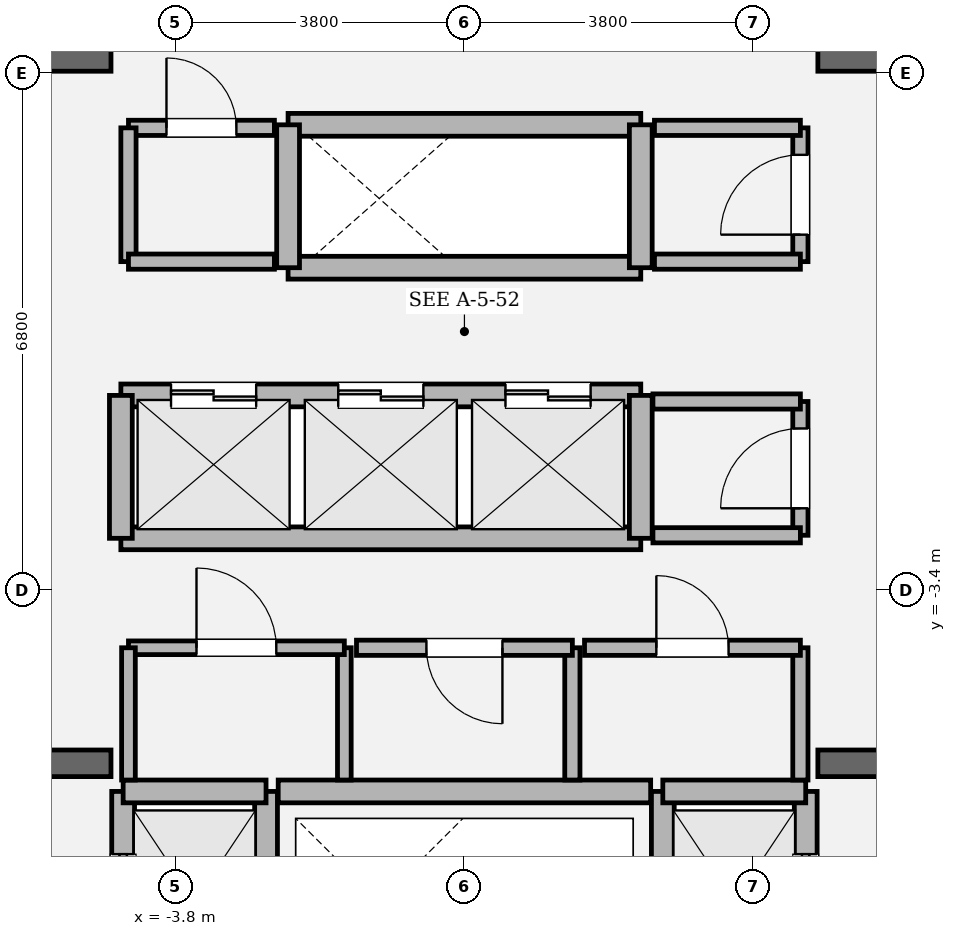
"""IFC4 building model, lengths in metres.
Left out: names, types, materials, properties, quantities, classifications, styles, units other than length and angle.
Written with IfcOpenShell. Run it as: python <this file> out.ifc"""

import sys

from ifc_helpers import new_model, si_unit, direction, frame, frame_2d, origin, place, context, subcontext, project, spatial, rectangle, extrude, element, fill, save


model = new_model("IFC4")
c1 = context("Model", 3, precision=1e-05, world=origin(), true_north=direction((0.0, 1.0)))
c2 = subcontext(c1, "Body", "Model", "MODEL_VIEW")
j1 = project(units=[si_unit("LENGTHUNIT", "METRE"), si_unit("PLANEANGLEUNIT", "RADIAN")], contexts=[c1])
p1 = place(None, origin())
s1 = spatial("IfcSite", under=j1, at=p1, CompositionType="ELEMENT")
p2 = place(p1, origin())
s2 = spatial("IfcBuilding", under=s1, at=p2, CompositionType="ELEMENT")
p3 = place(p2, frame((0.0, 0.0, 251.4)))
s3 = spatial("IfcBuildingStorey", under=s2, at=p3, CompositionType="ELEMENT", Elevation=251.4)
p4 = place(p3, frame((-9.925, -5.68, 0.0), z_axis=(0.0, 0.0, 1.0), x_axis=(1.0, 0.0, 0.0)))
e1 = element("IfcWall", 1, at=p4, inside=s3, PredefinedType="SOLIDWALL", context=c2, shape_type="SweptSolid", body=[
    extrude(rectangle(XDim=5.275, YDim=0.35, at=frame_2d((2.638, 0.0))), origin(), (0.0, 0.0, 1.0), 4.05),
])
p5 = place(p4, frame((1.385, 0.0, 0.0)))
e2 = element("IfcOpeningElement", 2, at=p5, cuts=e1, PredefinedType="OPENING", context=c2, shape_type="SweptSolid", body=[
    extrude(rectangle(XDim=1.18, YDim=2.2, at=frame_2d((0.59, 1.1))), frame((0.0, 0.185, 0.0), z_axis=(0.0, -1.0, 0.0), x_axis=(1.0, 0.0, 0.0)), (0.0, 0.0, 1.0), 0.37),
])
p6 = place(p3, frame((4.65, -5.68, 0.0), z_axis=(0.0, 0.0, 1.0), x_axis=(1.0, 0.0, 0.0)))
e3 = element("IfcWall", 3, at=p6, inside=s3, PredefinedType="SOLIDWALL", context=c2, shape_type="SweptSolid", body=[
    extrude(rectangle(XDim=5.275, YDim=0.35, at=frame_2d((2.638, 0.0))), origin(), (0.0, 0.0, 1.0), 4.05),
])
p7 = place(p6, frame((2.71, 0.0, 0.0)))
e4 = element("IfcOpeningElement", 4, at=p7, cuts=e3, PredefinedType="OPENING", context=c2, shape_type="SweptSolid", body=[
    extrude(rectangle(XDim=1.18, YDim=2.2, at=frame_2d((0.59, 1.1))), frame((0.0, 0.185, 0.0), z_axis=(0.0, -1.0, 0.0), x_axis=(1.0, 0.0, 0.0)), (0.0, 0.0, 1.0), 0.37),
])
for number, where, z_axis, x_axis in (
    (5, (-9.925, 3.6, 0.0), (0.0, 0.0, 1.0), (1.0, 0.0, 0.0)),
    (6, (4.65, 3.6, 0.0), (0.0, 0.0, 1.0), (1.0, 0.0, 0.0)),
):
    element("IfcWall", number, at=place(p3, frame(where, z_axis=z_axis, x_axis=x_axis)), inside=s3, PredefinedType="SOLIDWALL", context=c2, shape_type="SweptSolid", body=[
        extrude(rectangle(XDim=5.275, YDim=0.35, at=frame_2d((2.638, 0.0))), origin(), (0.0, 0.0, 1.0), 4.05),
    ])
p8 = place(p3, frame((-4.49, -8.82, 0.0), z_axis=(0.0, 0.0, 1.0), x_axis=(0.0, 1.0, 0.0)))
e7 = element("IfcWall", 7, at=p8, inside=s3, PredefinedType="SOLIDWALL", context=c2, shape_type="SweptSolid", body=[
    extrude(rectangle(XDim=2.77, YDim=0.3, at=frame_2d((1.385, 0.0))), origin(), (0.0, 0.0, 1.0), 3.85),
])
p9 = place(p8, frame((0.825, 0.0, 0.0)))
e8 = element("IfcOpeningElement", 8, at=p9, cuts=e7, PredefinedType="OPENING", context=c2, shape_type="SweptSolid", body=[
    extrude(rectangle(XDim=1.12, YDim=2.25, at=frame_2d((0.56, 1.125))), frame((0.0, 0.16, 0.0), z_axis=(0.0, -1.0, 0.0), x_axis=(1.0, 0.0, 0.0)), (0.0, 0.0, 1.0), 0.32),
])
p10 = place(p3, frame((-2.61, -8.82, 0.0), z_axis=(0.0, 0.0, 1.0), x_axis=(0.0, 1.0, 0.0)))
e9 = element("IfcWall", 9, at=p10, inside=s3, PredefinedType="SOLIDWALL", context=c2, shape_type="SweptSolid", body=[
    extrude(rectangle(XDim=2.77, YDim=0.3, at=frame_2d((1.385, 0.0))), origin(), (0.0, 0.0, 1.0), 3.85),
])
p11 = place(p3, frame((-4.49, -6.05, 0.0), z_axis=(0.0, 0.0, 1.0), x_axis=(1.0, 0.0, 0.0)))
e10 = element("IfcWall", 10, at=p11, inside=s3, PredefinedType="SOLIDWALL", context=c2, shape_type="SweptSolid", body=[
    extrude(rectangle(XDim=1.88, YDim=0.3, at=frame_2d((0.94, 0.0))), origin(), (0.0, 0.0, 1.0), 3.85),
])
p12 = place(p3, frame((4.49, -8.82, 0.0), z_axis=(0.0, 0.0, 1.0), x_axis=(0.0, 1.0, 0.0)))
e11 = element("IfcWall", 11, at=p12, inside=s3, PredefinedType="SOLIDWALL", context=c2, shape_type="SweptSolid", body=[
    extrude(rectangle(XDim=2.77, YDim=0.3, at=frame_2d((1.385, 0.0))), origin(), (0.0, 0.0, 1.0), 3.85),
])
p13 = place(p12, frame((0.825, 0.0, 0.0)))
e12 = element("IfcOpeningElement", 12, at=p13, cuts=e11, PredefinedType="OPENING", context=c2, shape_type="SweptSolid", body=[
    extrude(rectangle(XDim=1.12, YDim=2.25, at=frame_2d((0.56, 1.125))), frame((0.0, 0.16, 0.0), z_axis=(0.0, -1.0, 0.0), x_axis=(1.0, 0.0, 0.0)), (0.0, 0.0, 1.0), 0.32),
])
p14 = place(p3, frame((2.61, -8.82, 0.0), z_axis=(0.0, 0.0, 1.0), x_axis=(0.0, 1.0, 0.0)))
e13 = element("IfcWall", 13, at=p14, inside=s3, PredefinedType="SOLIDWALL", context=c2, shape_type="SweptSolid", body=[
    extrude(rectangle(XDim=2.77, YDim=0.3, at=frame_2d((1.385, 0.0))), origin(), (0.0, 0.0, 1.0), 3.85),
])
p15 = place(p3, frame((2.61, -6.05, 0.0), z_axis=(0.0, 0.0, 1.0), x_axis=(1.0, 0.0, 0.0)))
e14 = element("IfcWall", 14, at=p15, inside=s3, PredefinedType="SOLIDWALL", context=c2, shape_type="SweptSolid", body=[
    extrude(rectangle(XDim=1.88, YDim=0.3, at=frame_2d((0.94, 0.0))), origin(), (0.0, 0.0, 1.0), 3.85),
])
p16 = place(p3, frame((-4.52, -0.84, 0.0), z_axis=(0.0, 0.0, 1.0), x_axis=(1.0, 0.0, 0.0)))
e15 = element("IfcWall", 15, at=p16, inside=s3, PredefinedType="SOLIDWALL", context=c2, shape_type="SweptSolid", body=[
    extrude(rectangle(XDim=6.84, YDim=0.3, at=frame_2d((3.42, 0.0))), origin(), (0.0, 0.0, 1.0), 3.85),
])
p17 = place(p16, frame((0.66, 0.0, 0.0)))
e16 = element("IfcOpeningElement", 16, at=p17, cuts=e15, PredefinedType="OPENING", context=c2, shape_type="SweptSolid", body=[
    extrude(rectangle(XDim=1.12, YDim=2.25, at=frame_2d((0.56, 1.125))), frame((0.0, 0.16, 0.0), z_axis=(0.0, -1.0, 0.0), x_axis=(1.0, 0.0, 0.0)), (0.0, 0.0, 1.0), 0.32),
])
p18 = place(p16, frame((2.86, 0.0, 0.0)))
e17 = element("IfcOpeningElement", 17, at=p18, cuts=e15, PredefinedType="OPENING", context=c2, shape_type="SweptSolid", body=[
    extrude(rectangle(XDim=1.12, YDim=2.25, at=frame_2d((0.56, 1.125))), frame((0.0, 0.16, 0.0), z_axis=(0.0, -1.0, 0.0), x_axis=(1.0, 0.0, 0.0)), (0.0, 0.0, 1.0), 0.32),
])
p19 = place(p16, frame((5.06, 0.0, 0.0)))
e18 = element("IfcOpeningElement", 18, at=p19, cuts=e15, PredefinedType="OPENING", context=c2, shape_type="SweptSolid", body=[
    extrude(rectangle(XDim=1.12, YDim=2.25, at=frame_2d((0.56, 1.125))), frame((0.0, 0.16, 0.0), z_axis=(0.0, -1.0, 0.0), x_axis=(1.0, 0.0, 0.0)), (0.0, 0.0, 1.0), 0.32),
])
p20 = place(p3, frame((-4.52, -2.72, 0.0), z_axis=(0.0, 0.0, 1.0), x_axis=(1.0, 0.0, 0.0)))
e19 = element("IfcWall", 19, at=p20, inside=s3, PredefinedType="SOLIDWALL", context=c2, shape_type="SweptSolid", body=[
    extrude(rectangle(XDim=6.84, YDim=0.3, at=frame_2d((3.42, 0.0))), origin(), (0.0, 0.0, 1.0), 3.85),
])
for number, where, z_axis, x_axis in (
    (20, (-4.52, -2.72, 0.0), (0.0, 0.0, 1.0), (0.0, 1.0, 0.0)),
    (21, (2.32, -2.72, 0.0), (0.0, 0.0, 1.0), (0.0, 1.0, 0.0)),
):
    element("IfcWall", number, at=place(p3, frame(where, z_axis=z_axis, x_axis=x_axis)), inside=s3, PredefinedType="SOLIDWALL", context=c2, shape_type="SweptSolid", body=[
        extrude(rectangle(XDim=1.88, YDim=0.3, at=frame_2d((0.94, 0.0))), origin(), (0.0, 0.0, 1.0), 3.85),
    ])
for number, where, z_axis, x_axis in (
    (22, (-2.32, 0.84, 0.0), (0.0, 0.0, 1.0), (1.0, 0.0, 0.0)),
    (23, (-2.32, 2.72, 0.0), (0.0, 0.0, 1.0), (1.0, 0.0, 0.0)),
):
    element("IfcWall", number, at=place(p3, frame(where, z_axis=z_axis, x_axis=x_axis)), inside=s3, PredefinedType="SOLIDWALL", context=c2, shape_type="SweptSolid", body=[
        extrude(rectangle(XDim=4.64, YDim=0.3, at=frame_2d((2.32, 0.0))), origin(), (0.0, 0.0, 1.0), 3.85),
    ])
for number, where, z_axis, x_axis in (
    (24, (-2.32, 0.84, 0.0), (0.0, 0.0, 1.0), (0.0, 1.0, 0.0)),
    (25, (2.32, 0.84, 0.0), (0.0, 0.0, 1.0), (0.0, 1.0, 0.0)),
):
    element("IfcWall", number, at=place(p3, frame(where, z_axis=z_axis, x_axis=x_axis)), inside=s3, PredefinedType="SOLIDWALL", context=c2, shape_type="SweptSolid", body=[
        extrude(rectangle(XDim=1.88, YDim=0.3, at=frame_2d((0.94, 0.0))), origin(), (0.0, 0.0, 1.0), 3.85),
    ])
p21 = place(p3, frame((-2.45, -6.05, 0.0), z_axis=(0.0, 0.0, 1.0), x_axis=(1.0, 0.0, 0.0)))
e26 = element("IfcWall", 26, at=p21, inside=s3, PredefinedType="SOLIDWALL", context=c2, shape_type="SweptSolid", body=[
    extrude(rectangle(XDim=4.9, YDim=0.3, at=frame_2d((2.45, 0.0))), origin(), (0.0, 0.0, 1.0), 3.85),
])
p22 = place(p3, frame((-1.58, -5.9, 0.0), z_axis=(0.0, 0.0, 1.0), x_axis=(0.0, 1.0, 0.0)))
e27 = element("IfcWall", 27, at=p22, inside=s3, PredefinedType="PARTITIONING", context=c2, shape_type="SweptSolid", body=[
    extrude(rectangle(XDim=1.74, YDim=0.18, at=frame_2d((0.87, 0.0))), origin(), (0.0, 0.0, 1.0), 3.85),
])
p23 = place(p3, frame((-1.58, -4.16, 0.0), z_axis=(0.0, 0.0, 1.0), x_axis=(-1.0, 0.0, 0.0)))
e28 = element("IfcWall", 28, at=p23, inside=s3, PredefinedType="PARTITIONING", context=c2, shape_type="SweptSolid", body=[
    extrude(rectangle(XDim=2.84, YDim=0.18, at=frame_2d((1.42, 0.0))), origin(), (0.0, 0.0, 1.0), 3.85),
])
p24 = place(p23, frame((0.895, 0.0, 0.0)))
e29 = element("IfcOpeningElement", 29, at=p24, cuts=e28, PredefinedType="OPENING", context=c2, shape_type="SweptSolid", body=[
    extrude(rectangle(XDim=1.05, YDim=2.2, at=frame_2d((0.525, 1.1))), frame((0.0, 0.1, 0.0), z_axis=(0.0, -1.0, 0.0), x_axis=(1.0, 0.0, 0.0)), (0.0, 0.0, 1.0), 0.2),
])
p25 = place(p3, frame((-4.42, -4.16, 0.0), z_axis=(0.0, 0.0, 1.0), x_axis=(0.0, -1.0, 0.0)))
e30 = element("IfcWall", 30, at=p25, inside=s3, PredefinedType="PARTITIONING", context=c2, shape_type="SweptSolid", body=[
    extrude(rectangle(XDim=1.74, YDim=0.18, at=frame_2d((0.87, 0.0))), origin(), (0.0, 0.0, 1.0), 3.85),
])
p26 = place(p3, frame((1.42, -5.9, 0.0), z_axis=(0.0, 0.0, 1.0), x_axis=(0.0, 1.0, 0.0)))
e31 = element("IfcWall", 31, at=p26, inside=s3, PredefinedType="SOLIDWALL", context=c2, shape_type="SweptSolid", body=[
    extrude(rectangle(XDim=1.74, YDim=0.2, at=frame_2d((0.87, 0.0))), origin(), (0.0, 0.0, 1.0), 3.85),
])
p27 = place(p3, frame((1.42, -4.16, 0.0), z_axis=(0.0, 0.0, 1.0), x_axis=(-1.0, 0.0, 0.0)))
e32 = element("IfcWall", 32, at=p27, inside=s3, PredefinedType="SOLIDWALL", context=c2, shape_type="SweptSolid", body=[
    extrude(rectangle(XDim=2.84, YDim=0.2, at=frame_2d((1.42, 0.0))), origin(), (0.0, 0.0, 1.0), 3.85),
])
p28 = place(p27, frame((0.92, 0.0, 0.0)))
e33 = element("IfcOpeningElement", 33, at=p28, cuts=e32, PredefinedType="OPENING", context=c2, shape_type="SweptSolid", body=[
    extrude(rectangle(XDim=1.0, YDim=2.15, at=frame_2d((0.5, 1.075))), frame((0.0, 0.11, 0.0), z_axis=(0.0, -1.0, 0.0), x_axis=(1.0, 0.0, 0.0)), (0.0, 0.0, 1.0), 0.22),
])
p29 = place(p3, frame((4.42, -5.9, 0.0), z_axis=(0.0, 0.0, 1.0), x_axis=(0.0, 1.0, 0.0)))
e34 = element("IfcWall", 34, at=p29, inside=s3, PredefinedType="SOLIDWALL", context=c2, shape_type="SweptSolid", body=[
    extrude(rectangle(XDim=1.74, YDim=0.2, at=frame_2d((0.87, 0.0))), origin(), (0.0, 0.0, 1.0), 3.85),
])
p30 = place(p3, frame((4.42, -4.16, 0.0), z_axis=(0.0, 0.0, 1.0), x_axis=(-1.0, 0.0, 0.0)))
e35 = element("IfcWall", 35, at=p30, inside=s3, PredefinedType="SOLIDWALL", context=c2, shape_type="SweptSolid", body=[
    extrude(rectangle(XDim=2.84, YDim=0.2, at=frame_2d((1.42, 0.0))), origin(), (0.0, 0.0, 1.0), 3.85),
])
p31 = place(p30, frame((0.945, 0.0, 0.0)))
e36 = element("IfcOpeningElement", 36, at=p31, cuts=e35, PredefinedType="OPENING", context=c2, shape_type="SweptSolid", body=[
    extrude(rectangle(XDim=0.95, YDim=2.15, at=frame_2d((0.475, 1.075))), frame((0.0, 0.11, 0.0), z_axis=(0.0, -1.0, 0.0), x_axis=(1.0, 0.0, 0.0)), (0.0, 0.0, 1.0), 0.22),
])
p32 = place(p3, frame((4.42, -2.68, 0.0), z_axis=(0.0, 0.0, 1.0), x_axis=(0.0, 1.0, 0.0)))
e37 = element("IfcWall", 37, at=p32, inside=s3, PredefinedType="SOLIDWALL", context=c2, shape_type="SweptSolid", body=[
    extrude(rectangle(XDim=1.76, YDim=0.2, at=frame_2d((0.88, 0.0))), origin(), (0.0, 0.0, 1.0), 3.85),
])
p33 = place(p32, frame((0.355, 0.0, 0.0)))
e38 = element("IfcOpeningElement", 38, at=p33, cuts=e37, PredefinedType="OPENING", context=c2, shape_type="SweptSolid", body=[
    extrude(rectangle(XDim=1.05, YDim=2.2, at=frame_2d((0.525, 1.1))), frame((0.0, 0.11, 0.0), z_axis=(0.0, -1.0, 0.0), x_axis=(1.0, 0.0, 0.0)), (0.0, 0.0, 1.0), 0.22),
])
for number, where, z_axis, x_axis in (
    (39, (4.42, -0.92, 0.0), (0.0, 0.0, 1.0), (-1.0, 0.0, 0.0)),
    (40, (2.48, -2.68, 0.0), (0.0, 0.0, 1.0), (1.0, 0.0, 0.0)),
):
    element("IfcWall", number, at=place(p3, frame(where, z_axis=z_axis, x_axis=x_axis)), inside=s3, PredefinedType="SOLIDWALL", context=c2, shape_type="SweptSolid", body=[
        extrude(rectangle(XDim=1.94, YDim=0.2, at=frame_2d((0.97, 0.0))), origin(), (0.0, 0.0, 1.0), 3.85),
    ])
p34 = place(p3, frame((-2.5, 2.68, 0.0), z_axis=(0.0, 0.0, 1.0), x_axis=(-1.0, 0.0, 0.0)))
e41 = element("IfcWall", 41, at=p34, inside=s3, PredefinedType="SOLIDWALL", context=c2, shape_type="SweptSolid", body=[
    extrude(rectangle(XDim=1.92, YDim=0.2, at=frame_2d((0.96, 0.0))), origin(), (0.0, 0.0, 1.0), 3.85),
])
p35 = place(p34, frame((0.5, 0.0, 0.0)))
e42 = element("IfcOpeningElement", 42, at=p35, cuts=e41, PredefinedType="OPENING", context=c2, shape_type="SweptSolid", body=[
    extrude(rectangle(XDim=0.92, YDim=2.1, at=frame_2d((0.46, 1.05))), frame((0.0, 0.11, 0.0), z_axis=(0.0, -1.0, 0.0), x_axis=(1.0, 0.0, 0.0)), (0.0, 0.0, 1.0), 0.22),
])
p36 = place(p3, frame((-4.42, 2.68, 0.0), z_axis=(0.0, 0.0, 1.0), x_axis=(0.0, -1.0, 0.0)))
e43 = element("IfcWall", 43, at=p36, inside=s3, PredefinedType="SOLIDWALL", context=c2, shape_type="SweptSolid", body=[
    extrude(rectangle(XDim=1.76, YDim=0.2, at=frame_2d((0.88, 0.0))), origin(), (0.0, 0.0, 1.0), 3.85),
])
p37 = place(p3, frame((-4.42, 0.92, 0.0), z_axis=(0.0, 0.0, 1.0), x_axis=(1.0, 0.0, 0.0)))
e44 = element("IfcWall", 44, at=p37, inside=s3, PredefinedType="SOLIDWALL", context=c2, shape_type="SweptSolid", body=[
    extrude(rectangle(XDim=1.92, YDim=0.2, at=frame_2d((0.96, 0.0))), origin(), (0.0, 0.0, 1.0), 3.85),
])
p38 = place(p3, frame((4.42, 0.92, 0.0), z_axis=(0.0, 0.0, 1.0), x_axis=(0.0, 1.0, 0.0)))
e45 = element("IfcWall", 45, at=p38, inside=s3, PredefinedType="SOLIDWALL", context=c2, shape_type="SweptSolid", body=[
    extrude(rectangle(XDim=1.76, YDim=0.2, at=frame_2d((0.88, 0.0))), origin(), (0.0, 0.0, 1.0), 3.85),
])
p39 = place(p38, frame((0.355, 0.0, 0.0)))
e46 = element("IfcOpeningElement", 46, at=p39, cuts=e45, PredefinedType="OPENING", context=c2, shape_type="SweptSolid", body=[
    extrude(rectangle(XDim=1.05, YDim=2.2, at=frame_2d((0.525, 1.1))), frame((0.0, 0.11, 0.0), z_axis=(0.0, -1.0, 0.0), x_axis=(1.0, 0.0, 0.0)), (0.0, 0.0, 1.0), 0.22),
])
for number, where, z_axis, x_axis in (
    (47, (4.42, 2.68, 0.0), (0.0, 0.0, 1.0), (-1.0, 0.0, 0.0)),
    (48, (2.5, 0.92, 0.0), (0.0, 0.0, 1.0), (1.0, 0.0, 0.0)),
):
    element("IfcWall", number, at=place(p3, frame(where, z_axis=z_axis, x_axis=x_axis)), inside=s3, PredefinedType="SOLIDWALL", context=c2, shape_type="SweptSolid", body=[
        extrude(rectangle(XDim=1.92, YDim=0.2, at=frame_2d((0.96, 0.0))), origin(), (0.0, 0.0, 1.0), 3.85),
    ])
p40 = place(p9, origin())
e49 = element("IfcDoor", 49, at=p40, inside=s3, OperationType="SLIDING_TO_LEFT", PredefinedType="DOOR", context=c2, shape_type="SweptSolid", body=[
    extrude(rectangle(XDim=1.12, YDim=2.25, at=frame_2d((0.56, 1.125))), frame((0.0, 0.025, 0.0), z_axis=(0.0, -1.0, 0.0), x_axis=(1.0, 0.0, 0.0)), (0.0, 0.0, 1.0), 0.05),
])
fill(e8, e49)
p41 = place(p13, origin())
e50 = element("IfcDoor", 50, at=p41, inside=s3, OperationType="SLIDING_TO_RIGHT", PredefinedType="DOOR", context=c2, shape_type="SweptSolid", body=[
    extrude(rectangle(XDim=1.12, YDim=2.25, at=frame_2d((0.56, 1.125))), frame((0.0, 0.025, 0.0), z_axis=(0.0, -1.0, 0.0), x_axis=(1.0, 0.0, 0.0)), (0.0, 0.0, 1.0), 0.05),
])
fill(e12, e50)
p42 = place(p17, origin())
e51 = element("IfcDoor", 51, at=p42, inside=s3, OperationType="DOUBLE_DOOR_SLIDING", PredefinedType="DOOR", context=c2, shape_type="SweptSolid", body=[
    extrude(rectangle(XDim=1.12, YDim=2.25, at=frame_2d((0.56, 1.125))), frame((0.0, 0.025, 0.0), z_axis=(0.0, -1.0, 0.0), x_axis=(1.0, 0.0, 0.0)), (0.0, 0.0, 1.0), 0.05),
])
fill(e16, e51)
p43 = place(p18, origin())
e52 = element("IfcDoor", 52, at=p43, inside=s3, OperationType="DOUBLE_DOOR_SLIDING", PredefinedType="DOOR", context=c2, shape_type="SweptSolid", body=[
    extrude(rectangle(XDim=1.12, YDim=2.25, at=frame_2d((0.56, 1.125))), frame((0.0, 0.025, 0.0), z_axis=(0.0, -1.0, 0.0), x_axis=(1.0, 0.0, 0.0)), (0.0, 0.0, 1.0), 0.05),
])
fill(e17, e52)
p44 = place(p19, origin())
e53 = element("IfcDoor", 53, at=p44, inside=s3, OperationType="DOUBLE_DOOR_SLIDING", PredefinedType="DOOR", context=c2, shape_type="SweptSolid", body=[
    extrude(rectangle(XDim=1.12, YDim=2.25, at=frame_2d((0.56, 1.125))), frame((0.0, 0.025, 0.0), z_axis=(0.0, -1.0, 0.0), x_axis=(1.0, 0.0, 0.0)), (0.0, 0.0, 1.0), 0.05),
])
fill(e18, e53)
p45 = place(p24, origin())
e54 = element("IfcDoor", 54, at=p45, inside=s3, OperationType="SINGLE_SWING_RIGHT", PredefinedType="DOOR", context=c2, shape_type="SweptSolid", body=[
    extrude(rectangle(XDim=1.05, YDim=2.2, at=frame_2d((0.525, 1.1))), frame((0.0, 0.025, 0.0), z_axis=(0.0, -1.0, 0.0), x_axis=(1.0, 0.0, 0.0)), (0.0, 0.0, 1.0), 0.05),
])
fill(e29, e54)
p46 = place(p28, origin())
e55 = element("IfcDoor", 55, at=p46, inside=s3, OperationType="SINGLE_SWING_LEFT", PredefinedType="DOOR", context=c2, shape_type="SweptSolid", body=[
    extrude(rectangle(XDim=1.0, YDim=2.15, at=frame_2d((0.5, 1.075))), frame((0.0, 0.025, 0.0), z_axis=(0.0, -1.0, 0.0), x_axis=(1.0, 0.0, 0.0)), (0.0, 0.0, 1.0), 0.05),
])
fill(e33, e55)
p47 = place(p31, origin())
e56 = element("IfcDoor", 56, at=p47, inside=s3, OperationType="SINGLE_SWING_RIGHT", PredefinedType="DOOR", context=c2, shape_type="SweptSolid", body=[
    extrude(rectangle(XDim=0.95, YDim=2.15, at=frame_2d((0.475, 1.075))), frame((0.0, 0.025, 0.0), z_axis=(0.0, -1.0, 0.0), x_axis=(1.0, 0.0, 0.0)), (0.0, 0.0, 1.0), 0.05),
])
fill(e36, e56)
p48 = place(p33, origin())
e57 = element("IfcDoor", 57, at=p48, inside=s3, OperationType="SINGLE_SWING_LEFT", PredefinedType="DOOR", context=c2, shape_type="SweptSolid", body=[
    extrude(rectangle(XDim=1.05, YDim=2.2, at=frame_2d((0.525, 1.1))), frame((0.0, 0.025, 0.0), z_axis=(0.0, -1.0, 0.0), x_axis=(1.0, 0.0, 0.0)), (0.0, 0.0, 1.0), 0.05),
])
fill(e38, e57)
p49 = place(p35, origin())
e58 = element("IfcDoor", 58, at=p49, inside=s3, OperationType="SINGLE_SWING_RIGHT", PredefinedType="DOOR", context=c2, shape_type="SweptSolid", body=[
    extrude(rectangle(XDim=0.92, YDim=2.1, at=frame_2d((0.46, 1.05))), frame((0.0, 0.025, 0.0), z_axis=(0.0, -1.0, 0.0), x_axis=(1.0, 0.0, 0.0)), (0.0, 0.0, 1.0), 0.05),
])
fill(e42, e58)
p50 = place(p39, origin())
e59 = element("IfcDoor", 59, at=p50, inside=s3, OperationType="SINGLE_SWING_LEFT", PredefinedType="DOOR", context=c2, shape_type="SweptSolid", body=[
    extrude(rectangle(XDim=1.05, YDim=2.2, at=frame_2d((0.525, 1.1))), frame((0.0, 0.025, 0.0), z_axis=(0.0, -1.0, 0.0), x_axis=(1.0, 0.0, 0.0)), (0.0, 0.0, 1.0), 0.05),
])
fill(e46, e59)
save(model, sys.argv[1])
